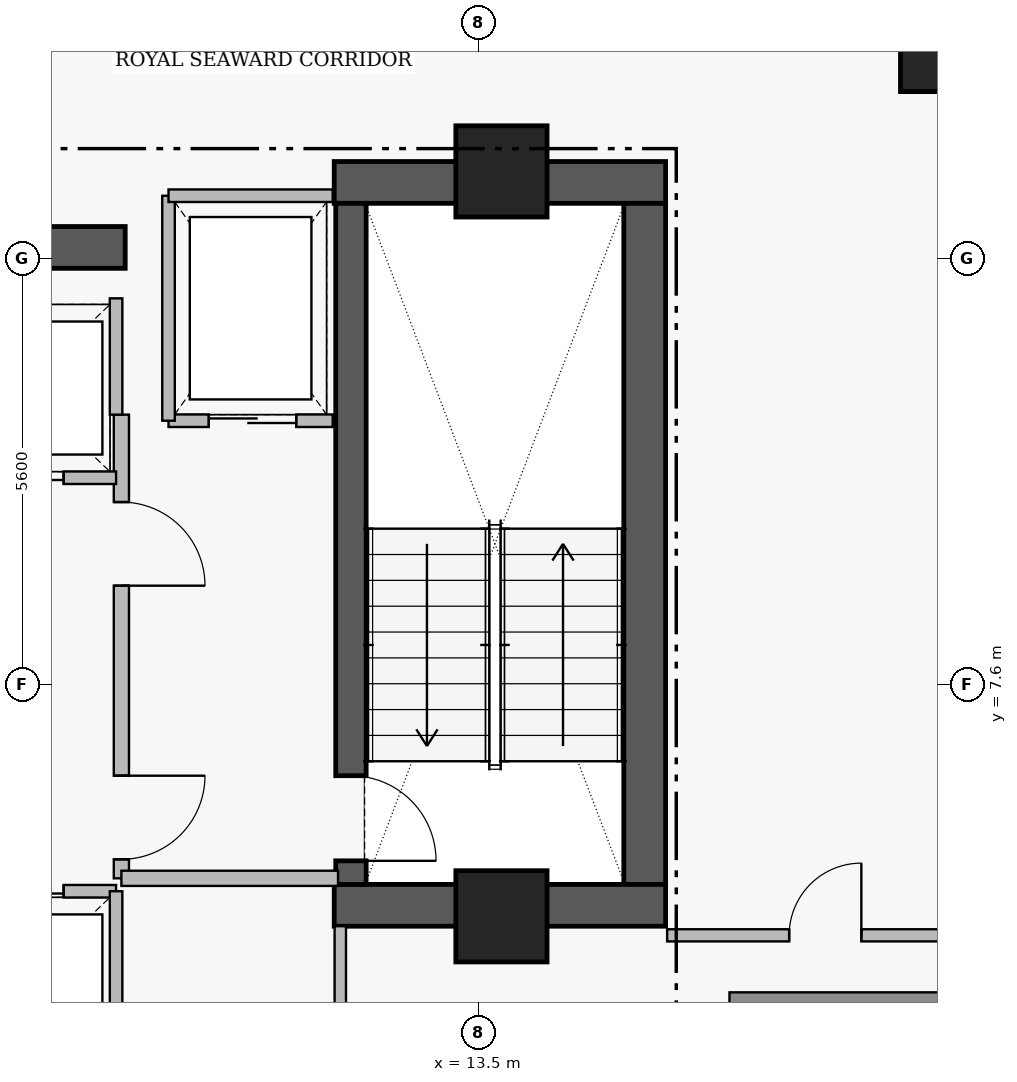
"""IFC4 building model, lengths in metres.
Left out: names, types, materials, properties, quantities, classifications, styles, units other than length and angle.
Written with IfcOpenShell. Run it as: python <this file> out.ifc"""

import sys

from ifc_helpers import new_model, si_unit, direction, frame, frame_2d, origin, origin_2d, place, context, subcontext, project, spatial, rectangle, extrude, element, fill, save


model = new_model("IFC4")
c1 = context("Model", 3, precision=1e-05, world=origin(), true_north=direction((0.0, 1.0)))
c2 = subcontext(c1, "Body", "Model", "MODEL_VIEW")
j1 = project(units=[si_unit("LENGTHUNIT", "METRE"), si_unit("PLANEANGLEUNIT", "RADIAN")], contexts=[c1])
p1 = place(None, origin())
s1 = spatial("IfcSite", under=j1, at=p1, CompositionType="ELEMENT")
p2 = place(p1, origin())
s2 = spatial("IfcBuilding", under=s1, at=p2, CompositionType="ELEMENT")
p3 = place(p2, frame((0.0, 0.0, 250.75)))
s3 = spatial("IfcBuildingStorey", under=s2, at=p3, CompositionType="ELEMENT", Elevation=250.75)
p4 = place(p3, frame((11.6, 14.205, 0.0), z_axis=(0.0, 0.0, 1.0), x_axis=(1.0, 0.0, 0.0)))
e1 = element("IfcWall", 1, at=p4, inside=s3, PredefinedType="SHEAR", context=c2, shape_type="SweptSolid", body=[
    extrude(rectangle(XDim=4.36, YDim=0.55, at=frame_2d((2.18, 0.0))), origin(), (0.0, 0.0, 1.0), 3.51),
])
p5 = place(p3, frame((15.685, 4.97, 0.0), z_axis=(0.0, 0.0, 1.0), x_axis=(0.0, 1.0, 0.0)))
e2 = element("IfcWall", 2, at=p5, inside=s3, PredefinedType="SHEAR", context=c2, shape_type="SweptSolid", body=[
    extrude(rectangle(XDim=8.96, YDim=0.55, at=frame_2d((4.48, 0.0))), origin(), (0.0, 0.0, 1.0), 3.51),
])
p6 = place(p3, frame((11.6, 4.695, 0.0), z_axis=(0.0, 0.0, 1.0), x_axis=(1.0, 0.0, 0.0)))
e3 = element("IfcWall", 3, at=p6, inside=s3, PredefinedType="SHEAR", context=c2, shape_type="SweptSolid", body=[
    extrude(rectangle(XDim=4.36, YDim=0.55, at=frame_2d((2.18, 0.0))), origin(), (0.0, 0.0, 1.0), 3.51),
])
p7 = place(p3, frame((1.25, 13.35, 0.0), z_axis=(0.0, 0.0, 1.0), x_axis=(1.0, 0.0, 0.0)))
e4 = element("IfcWall", 4, at=p7, inside=s3, PredefinedType="SHEAR", context=c2, shape_type="SweptSolid", body=[
    extrude(rectangle(XDim=7.6, YDim=0.55, at=frame_2d((3.8, 0.0))), origin(), (0.0, 0.0, 1.0), 3.48),
])
p8 = place(p3, frame((11.82, 13.93, 0.0), z_axis=(0.0, 0.0, 1.0), x_axis=(0.0, -1.0, 0.0)))
e5 = element("IfcWall", 5, at=p8, inside=s3, PredefinedType="SHEAR", context=c2, shape_type="SweptSolid", body=[
    extrude(rectangle(XDim=8.96, YDim=0.4, at=frame_2d((4.48, 0.0))), origin(), (0.0, 0.0, 1.0), 3.51),
])
p9 = place(p8, frame((7.53, 0.0, 0.0)))
e6 = element("IfcOpeningElement", 6, at=p9, cuts=e5, PredefinedType="OPENING", context=c2, shape_type="SweptSolid", body=[
    extrude(rectangle(XDim=1.12, YDim=2.22, at=frame_2d((0.56, 1.11))), frame((0.0, 0.21, 0.0), z_axis=(0.0, -1.0, 0.0), x_axis=(1.0, 0.0, 0.0)), (0.0, 0.0, 1.0), 0.42),
])
for number, where, z_axis, x_axis in (
    (7, (13.8, 14.35, 0.0), (0.0, 0.0, 1.0), (1.0, 0.0, 0.0)),
    (8, (13.8, 4.55, 0.0), (0.0, 0.0, 1.0), (1.0, 0.0, 0.0)),
):
    element("IfcColumn", number, at=place(p3, frame(where, z_axis=z_axis, x_axis=x_axis)), inside=s3, PredefinedType="COLUMN", context=c2, shape_type="SweptSolid", body=[
        extrude(rectangle(XDim=1.2, YDim=1.2, at=origin_2d()), origin(), (0.0, 0.0, 1.0), 3.7),
    ])
p10 = place(p3, frame((19.55, 15.9, 0.0), z_axis=(0.0, 0.0, 1.0), x_axis=(1.0, 0.0, 0.0)))
e9 = element("IfcColumn", 9, at=p10, inside=s3, PredefinedType="COLUMN", context=c2, shape_type="SweptSolid", body=[
    extrude(rectangle(XDim=1.0, YDim=1.0, at=origin_2d()), origin(), (0.0, 0.0, 1.0), 3.7),
])
p11 = place(p3, frame((20.2, 3.4, 0.0), z_axis=(0.0, 0.0, 1.0), x_axis=(-1.0, 0.0, 0.0)))
e10 = element("IfcWall", 10, at=p11, inside=s3, PredefinedType="STANDARD", context=c2, shape_type="SweptSolid", body=[
    extrude(rectangle(XDim=3.4, YDim=0.3, at=frame_2d((1.7, 0.0))), origin(), (0.0, 0.0, 1.0), 3.48),
])
p12 = place(p3, frame((8.8, 11.15, 0.0), z_axis=(0.0, 0.0, 1.0), x_axis=(0.0, -1.0, 0.0)))
e11 = element("IfcWall", 11, at=p12, inside=s3, PredefinedType="PARTITIONING", context=c2, shape_type="SweptSolid", body=[
    extrude(rectangle(XDim=6.1, YDim=0.2, at=frame_2d((3.05, 0.0))), origin(), (0.0, 0.0, 1.0), 3.48),
])
p13 = place(p12, frame((1.15, 0.0, 0.0)))
e12 = element("IfcOpeningElement", 12, at=p13, cuts=e11, PredefinedType="OPENING", context=c2, shape_type="SweptSolid", body=[
    extrude(rectangle(XDim=1.1, YDim=2.2, at=frame_2d((0.55, 1.1))), frame((0.0, 0.11, 0.0), z_axis=(0.0, -1.0, 0.0), x_axis=(1.0, 0.0, 0.0)), (0.0, 0.0, 1.0), 0.22),
])
p14 = place(p12, frame((4.75, 0.0, 0.0)))
e13 = element("IfcOpeningElement", 13, at=p14, cuts=e11, PredefinedType="OPENING", context=c2, shape_type="SweptSolid", body=[
    extrude(rectangle(XDim=1.1, YDim=2.2, at=frame_2d((0.55, 1.1))), frame((0.0, 0.11, 0.0), z_axis=(0.0, -1.0, 0.0), x_axis=(1.0, 0.0, 0.0)), (0.0, 0.0, 1.0), 0.22),
])
p15 = place(p3, frame((9.42, 11.07, 0.0), z_axis=(0.0, 0.0, 1.0), x_axis=(1.0, 0.0, 0.0)))
e14 = element("IfcWall", 14, at=p15, inside=s3, PredefinedType="PARTITIONING", context=c2, shape_type="SweptSolid", body=[
    extrude(rectangle(XDim=2.16, YDim=0.165, at=frame_2d((1.08, 0.0))), origin(), (0.0, 0.0, 1.0), 3.48),
])
p16 = place(p15, frame((0.53, 0.0, 0.0)))
e15 = element("IfcOpeningElement", 15, at=p16, cuts=e14, PredefinedType="OPENING", context=c2, shape_type="SweptSolid", body=[
    extrude(rectangle(XDim=1.15, YDim=2.25, at=frame_2d((0.575, 1.125))), frame((0.0, 0.093, 0.0), z_axis=(0.0, -1.0, 0.0), x_axis=(1.0, 0.0, 0.0)), (0.0, 0.0, 1.0), 0.185),
])
p17 = place(p3, frame((6.25, 4.88, 0.0), z_axis=(0.0, 0.0, 1.0), x_axis=(1.0, 0.0, 0.0)))
e16 = element("IfcWall", 16, at=p17, inside=s3, PredefinedType="PARTITIONING", context=c2, shape_type="SweptSolid", body=[
    extrude(rectangle(XDim=2.48, YDim=0.165, at=frame_2d((1.24, 0.0))), origin(), (0.0, 0.0, 1.0), 3.48),
])
p18 = place(p17, frame((0.69, 0.0, 0.0)))
e17 = element("IfcOpeningElement", 17, at=p18, cuts=e16, PredefinedType="OPENING", context=c2, shape_type="SweptSolid", body=[
    extrude(rectangle(XDim=1.1, YDim=2.25, at=frame_2d((0.55, 1.125))), frame((0.0, 0.093, 0.0), z_axis=(0.0, -1.0, 0.0), x_axis=(1.0, 0.0, 0.0)), (0.0, 0.0, 1.0), 0.185),
])
p19 = place(p3, frame((6.25, 10.32, 0.0), z_axis=(0.0, 0.0, 1.0), x_axis=(1.0, 0.0, 0.0)))
e18 = element("IfcWall", 18, at=p19, inside=s3, PredefinedType="PARTITIONING", context=c2, shape_type="SweptSolid", body=[
    extrude(rectangle(XDim=2.48, YDim=0.165, at=frame_2d((1.24, 0.0))), origin(), (0.0, 0.0, 1.0), 3.48),
])
p20 = place(p19, frame((0.69, 0.0, 0.0)))
e19 = element("IfcOpeningElement", 19, at=p20, cuts=e18, PredefinedType="OPENING", context=c2, shape_type="SweptSolid", body=[
    extrude(rectangle(XDim=1.1, YDim=2.25, at=frame_2d((0.55, 1.125))), frame((0.0, 0.093, 0.0), z_axis=(0.0, -1.0, 0.0), x_axis=(1.0, 0.0, 0.0)), (0.0, 0.0, 1.0), 0.185),
])
p21 = place(p3, frame((15.98, 4.3, 0.0), z_axis=(0.0, 0.0, 1.0), x_axis=(1.0, 0.0, 0.0)))
e20 = element("IfcWall", 20, at=p21, inside=s3, PredefinedType="PARTITIONING", context=c2, shape_type="SweptSolid", body=[
    extrude(rectangle(XDim=4.16, YDim=0.16, at=frame_2d((2.08, 0.0))), origin(), (0.0, 0.0, 1.0), 3.48),
])
p22 = place(p21, frame((1.605, 0.0, 0.0)))
e21 = element("IfcOpeningElement", 21, at=p22, cuts=e20, PredefinedType="OPENING", context=c2, shape_type="SweptSolid", body=[
    extrude(rectangle(XDim=0.95, YDim=2.15, at=frame_2d((0.475, 1.075))), frame((0.0, 0.09, 0.0), z_axis=(0.0, -1.0, 0.0), x_axis=(1.0, 0.0, 0.0)), (0.0, 0.0, 1.0), 0.18),
])
p23 = place(p3, frame((8.8, 5.05, 0.0), z_axis=(0.0, 0.0, 1.0), x_axis=(1.0, 0.0, 0.0)))
e22 = element("IfcWall", 22, at=p23, inside=s3, PredefinedType="PARTITIONING", context=c2, shape_type="SweptSolid", body=[
    extrude(rectangle(XDim=2.85, YDim=0.2, at=frame_2d((1.425, 0.0))), origin(), (0.0, 0.0, 1.0), 3.48),
])
p24 = place(p3, frame((9.42, 11.07, 0.0), z_axis=(0.0, 0.0, 1.0), x_axis=(0.0, 1.0, 0.0)))
e23 = element("IfcWall", 23, at=p24, inside=s3, PredefinedType="PARTITIONING", context=c2, shape_type="SweptSolid", body=[
    extrude(rectangle(XDim=2.96, YDim=0.165, at=frame_2d((1.48, 0.0))), origin(), (0.0, 0.0, 1.0), 3.48),
])
p25 = place(p3, frame((9.42, 14.03, 0.0), z_axis=(0.0, 0.0, 1.0), x_axis=(1.0, 0.0, 0.0)))
e24 = element("IfcWall", 24, at=p25, inside=s3, PredefinedType="PARTITIONING", context=c2, shape_type="SweptSolid", body=[
    extrude(rectangle(XDim=2.16, YDim=0.165, at=frame_2d((1.08, 0.0))), origin(), (0.0, 0.0, 1.0), 3.48),
])
p26 = place(p3, frame((8.73, 2.52, 0.0), z_axis=(0.0, 0.0, 1.0), x_axis=(0.0, 1.0, 0.0)))
e25 = element("IfcWall", 25, at=p26, inside=s3, PredefinedType="PARTITIONING", context=c2, shape_type="SweptSolid", body=[
    extrude(rectangle(XDim=2.36, YDim=0.165, at=frame_2d((1.18, 0.0))), origin(), (0.0, 0.0, 1.0), 3.48),
])
p27 = place(p3, frame((8.73, 11.15, 0.0), z_axis=(0.0, 0.0, 1.0), x_axis=(0.0, 1.0, 0.0)))
e26 = element("IfcWall", 26, at=p27, inside=s3, PredefinedType="PARTITIONING", context=c2, shape_type="SweptSolid", body=[
    extrude(rectangle(XDim=1.53, YDim=0.165, at=frame_2d((0.765, 0.0))), origin(), (0.0, 0.0, 1.0), 3.48),
])
p28 = place(p3, frame((11.68, 1.72, 0.0), z_axis=(0.0, 0.0, 1.0), x_axis=(0.0, 1.0, 0.0)))
e27 = element("IfcWall", 27, at=p28, inside=s3, PredefinedType="PARTITIONING", context=c2, shape_type="SweptSolid", body=[
    extrude(rectangle(XDim=2.7, YDim=0.15, at=frame_2d((1.35, 0.0))), origin(), (0.0, 0.0, 1.0), 3.48),
])
p29 = place(p9, origin())
e28 = element("IfcDoor", 28, at=p29, inside=s3, OperationType="SINGLE_SWING_RIGHT", PredefinedType="DOOR", context=c2, shape_type="SweptSolid", body=[
    extrude(rectangle(XDim=1.12, YDim=2.22, at=frame_2d((0.56, 1.11))), frame((0.0, 0.025, 0.0), z_axis=(0.0, -1.0, 0.0), x_axis=(1.0, 0.0, 0.0)), (0.0, 0.0, 1.0), 0.05),
])
fill(e6, e28)
p30 = place(p13, origin())
e29 = element("IfcDoor", 29, at=p30, inside=s3, OperationType="SINGLE_SWING_RIGHT", PredefinedType="DOOR", context=c2, shape_type="SweptSolid", body=[
    extrude(rectangle(XDim=1.1, YDim=2.2, at=frame_2d((0.55, 1.1))), frame((0.0, 0.025, 0.0), z_axis=(0.0, -1.0, 0.0), x_axis=(1.0, 0.0, 0.0)), (0.0, 0.0, 1.0), 0.05),
])
fill(e12, e29)
p31 = place(p14, origin())
e30 = element("IfcDoor", 30, at=p31, inside=s3, OperationType="SINGLE_SWING_LEFT", PredefinedType="DOOR", context=c2, shape_type="SweptSolid", body=[
    extrude(rectangle(XDim=1.1, YDim=2.2, at=frame_2d((0.55, 1.1))), frame((0.0, 0.025, 0.0), z_axis=(0.0, -1.0, 0.0), x_axis=(1.0, 0.0, 0.0)), (0.0, 0.0, 1.0), 0.05),
])
fill(e13, e30)
p32 = place(p16, origin())
e31 = element("IfcDoor", 31, at=p32, inside=s3, OperationType="SLIDING_TO_LEFT", PredefinedType="DOOR", context=c2, shape_type="SweptSolid", body=[
    extrude(rectangle(XDim=1.15, YDim=2.25, at=frame_2d((0.575, 1.125))), frame((0.0, 0.025, 0.0), z_axis=(0.0, -1.0, 0.0), x_axis=(1.0, 0.0, 0.0)), (0.0, 0.0, 1.0), 0.05),
])
fill(e15, e31)
p33 = place(p18, origin())
e32 = element("IfcDoor", 32, at=p33, inside=s3, OperationType="SLIDING_TO_LEFT", PredefinedType="DOOR", context=c2, shape_type="SweptSolid", body=[
    extrude(rectangle(XDim=1.1, YDim=2.25, at=frame_2d((0.55, 1.125))), frame((0.0, 0.025, 0.0), z_axis=(0.0, -1.0, 0.0), x_axis=(1.0, 0.0, 0.0)), (0.0, 0.0, 1.0), 0.05),
])
fill(e17, e32)
p34 = place(p20, origin())
e33 = element("IfcDoor", 33, at=p34, inside=s3, OperationType="SLIDING_TO_LEFT", PredefinedType="DOOR", context=c2, shape_type="SweptSolid", body=[
    extrude(rectangle(XDim=1.1, YDim=2.25, at=frame_2d((0.55, 1.125))), frame((0.0, 0.025, 0.0), z_axis=(0.0, -1.0, 0.0), x_axis=(1.0, 0.0, 0.0)), (0.0, 0.0, 1.0), 0.05),
])
fill(e19, e33)
p35 = place(p22, origin())
e34 = element("IfcDoor", 34, at=p35, inside=s3, OperationType="SINGLE_SWING_RIGHT", PredefinedType="DOOR", context=c2, shape_type="SweptSolid", body=[
    extrude(rectangle(XDim=0.95, YDim=2.15, at=frame_2d((0.475, 1.075))), frame((0.0, 0.025, 0.0), z_axis=(0.0, -1.0, 0.0), x_axis=(1.0, 0.0, 0.0)), (0.0, 0.0, 1.0), 0.05),
])
fill(e21, e34)
save(model, sys.argv[1])
